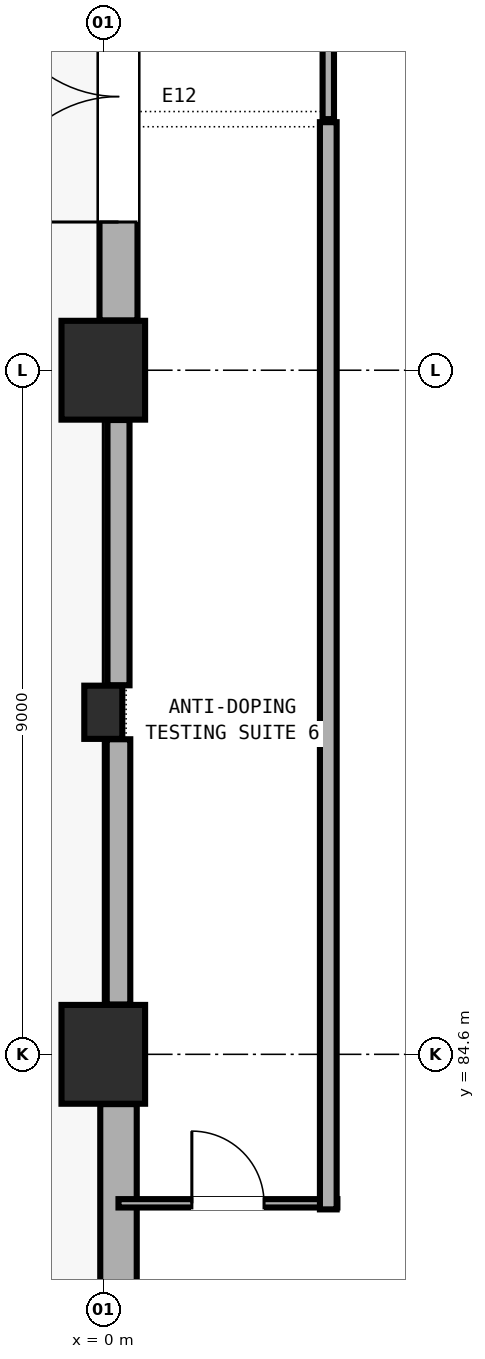
"""IFC4 building model, lengths in metres.
Left out: names, types, materials, properties, quantities, classifications, styles, units other than length and angle.
Written with IfcOpenShell. Run it as: python <this file> out.ifc"""

import sys

from ifc_helpers import new_model, si_unit, direction, frame, frame_2d, origin, origin_2d, place, context, subcontext, project, spatial, rectangle, extrude, element, fill, save


model = new_model("IFC4")
c1 = context("Model", 3, precision=1e-05, world=origin(), true_north=direction((0.0, 1.0)))
c2 = subcontext(c1, "Body", "Model", "MODEL_VIEW")
j1 = project(units=[si_unit("LENGTHUNIT", "METRE"), si_unit("PLANEANGLEUNIT", "RADIAN")], contexts=[c1])
p1 = place(None, origin())
s1 = spatial("IfcSite", under=j1, at=p1, CompositionType="ELEMENT")
p2 = place(p1, origin())
s2 = spatial("IfcBuilding", under=s1, at=p2, CompositionType="ELEMENT")
p3 = place(p2, origin())
s3 = spatial("IfcBuildingStorey", under=s2, at=p3, CompositionType="ELEMENT", Elevation=0.0)
for number, where, z_axis, x_axis in (
    (1, (0.0, 84.6, 0.0), (0.0, 0.0, 1.0), (1.0, 0.0, 0.0)),
    (2, (0.0, 93.6, 0.0), (0.0, 0.0, 1.0), (1.0, 0.0, 0.0)),
):
    element("IfcColumn", number, at=place(p3, frame(where, z_axis=z_axis, x_axis=x_axis)), inside=s3, PredefinedType="COLUMN", context=c2, shape_type="SweptSolid", body=[
        extrude(rectangle(XDim=1.1, YDim=1.3, at=origin_2d()), origin(), (0.0, 0.0, 1.0), 4.8),
    ])
p4 = place(p3, frame((0.0, 89.1, 0.0), z_axis=(0.0, 0.0, 1.0), x_axis=(1.0, 0.0, 0.0)))
e3 = element("IfcColumn", 3, at=p4, inside=s3, PredefinedType="PILASTER", context=c2, shape_type="SweptSolid", body=[
    extrude(rectangle(XDim=0.5, YDim=0.7, at=origin_2d()), origin(), (0.0, 0.0, 1.0), 4.8),
])
p5 = place(p3, frame((0.2, 78.055, 0.0), z_axis=(0.0, 0.0, 1.0), x_axis=(0.0, 1.0, 0.0)))
e4 = element("IfcWall", 4, at=p5, inside=s3, PredefinedType="SOLIDWALL", context=c2, shape_type="SweptSolid", body=[
    extrude(rectangle(XDim=5.89, YDim=0.48, at=frame_2d((2.945, 0.0))), origin(), (0.0, 0.0, 1.0), 3.58),
])
p6 = place(p3, frame((0.2, 85.255, 0.0), z_axis=(0.0, 0.0, 1.0), x_axis=(0.0, 1.0, 0.0)))
e5 = element("IfcWall", 5, at=p6, inside=s3, PredefinedType="SOLIDWALL", context=c2, shape_type="SweptSolid", body=[
    extrude(rectangle(XDim=3.49, YDim=0.31, at=frame_2d((1.745, 0.0))), origin(), (0.0, 0.0, 1.0), 3.58),
])
p7 = place(p3, frame((0.2, 89.455, 0.0), z_axis=(0.0, 0.0, 1.0), x_axis=(0.0, 1.0, 0.0)))
e6 = element("IfcWall", 6, at=p7, inside=s3, PredefinedType="SOLIDWALL", context=c2, shape_type="SweptSolid", body=[
    extrude(rectangle(XDim=3.49, YDim=0.29, at=frame_2d((1.745, 0.0))), origin(), (0.0, 0.0, 1.0), 3.58),
])
p8 = place(p3, frame((0.2, 94.255, 0.0), z_axis=(0.0, 0.0, 1.0), x_axis=(0.0, 1.0, 0.0)))
e7 = element("IfcWall", 7, at=p8, inside=s3, PredefinedType="SOLIDWALL", context=c2, shape_type="SweptSolid", body=[
    extrude(rectangle(XDim=5.89, YDim=0.5, at=frame_2d((2.945, 0.0))), origin(), (0.0, 0.0, 1.0), 3.58),
])
p9 = place(p8, frame((1.295, 0.0, 0.0)))
e8 = element("IfcOpeningElement", 8, at=p9, cuts=e7, PredefinedType="OPENING", context=c2, shape_type="SweptSolid", body=[
    extrude(rectangle(XDim=3.3, YDim=2.55, at=frame_2d((1.65, 1.275))), frame((0.0, 0.26, 0.0), z_axis=(0.0, -1.0, 0.0), x_axis=(1.0, 0.0, 0.0)), (0.0, 0.0, 1.0), 0.52),
])
p10 = place(p3, frame((0.2, 82.64, 0.0), z_axis=(0.0, 0.0, 1.0), x_axis=(1.0, 0.0, 0.0)))
e9 = element("IfcWall", 9, at=p10, inside=s3, PredefinedType="PARTITIONING", context=c2, shape_type="SweptSolid", body=[
    extrude(rectangle(XDim=2.88, YDim=0.11, at=frame_2d((1.44, 0.0))), origin(), (0.0, 0.0, 1.0), 3.28),
])
p11 = place(p10, frame((0.965, 0.0, 0.0)))
e10 = element("IfcOpeningElement", 10, at=p11, cuts=e9, PredefinedType="OPENING", context=c2, shape_type="SweptSolid", body=[
    extrude(rectangle(XDim=0.95, YDim=2.18, at=frame_2d((0.475, 1.09))), frame((0.0, 0.065, 0.0), z_axis=(0.0, -1.0, 0.0), x_axis=(1.0, 0.0, 0.0)), (0.0, 0.0, 1.0), 0.13),
])
p12 = place(p3, frame((2.96, 96.863, 0.0), z_axis=(0.0, 0.0, 1.0), x_axis=(0.0, -1.0, 0.0)))
e11 = element("IfcWall", 11, at=p12, inside=s3, PredefinedType="PARTITIONING", context=c2, shape_type="SweptSolid", body=[
    extrude(rectangle(XDim=14.303, YDim=0.22, at=frame_2d((7.152, 0.0))), origin(), (0.0, 0.0, 1.0), 3.28),
])
p13 = place(p3, frame((2.96, 96.903, 0.0), z_axis=(0.0, 0.0, 1.0), x_axis=(0.0, 1.0, 0.0)))
e12 = element("IfcWall", 12, at=p13, inside=s3, PredefinedType="PARTITIONING", context=c2, shape_type="SweptSolid", body=[
    extrude(rectangle(XDim=14.263, YDim=0.15, at=frame_2d((7.132, 0.0))), origin(), (0.0, 0.0, 1.0), 3.28),
])
p14 = place(p13, frame((6.592, 0.0, 0.0)))
e13 = element("IfcOpeningElement", 13, at=p14, cuts=e12, PredefinedType="OPENING", context=c2, shape_type="SweptSolid", body=[
    extrude(rectangle(XDim=1.08, YDim=2.18, at=frame_2d((0.54, 1.09))), frame((0.0, 0.085, 0.0), z_axis=(0.0, -1.0, 0.0), x_axis=(1.0, 0.0, 0.0)), (0.0, 0.0, 1.0), 0.17),
])
p15 = place(p9, origin())
e14 = element("IfcDoor", 14, at=p15, inside=s3, OperationType="DOUBLE_DOOR_SINGLE_SWING", PredefinedType="DOOR", context=c2, shape_type="SweptSolid", body=[
    extrude(rectangle(XDim=3.3, YDim=2.55, at=frame_2d((1.65, 1.275))), frame((0.0, 0.025, 0.0), z_axis=(0.0, -1.0, 0.0), x_axis=(1.0, 0.0, 0.0)), (0.0, 0.0, 1.0), 0.05),
])
fill(e8, e14)
p16 = place(p11, origin())
e15 = element("IfcDoor", 15, at=p16, inside=s3, OperationType="SINGLE_SWING_LEFT", PredefinedType="DOOR", context=c2, shape_type="SweptSolid", body=[
    extrude(rectangle(XDim=0.95, YDim=2.18, at=frame_2d((0.475, 1.09))), frame((0.0, 0.025, 0.0), z_axis=(0.0, -1.0, 0.0), x_axis=(1.0, 0.0, 0.0)), (0.0, 0.0, 1.0), 0.05),
])
fill(e10, e15)
save(model, sys.argv[1])
